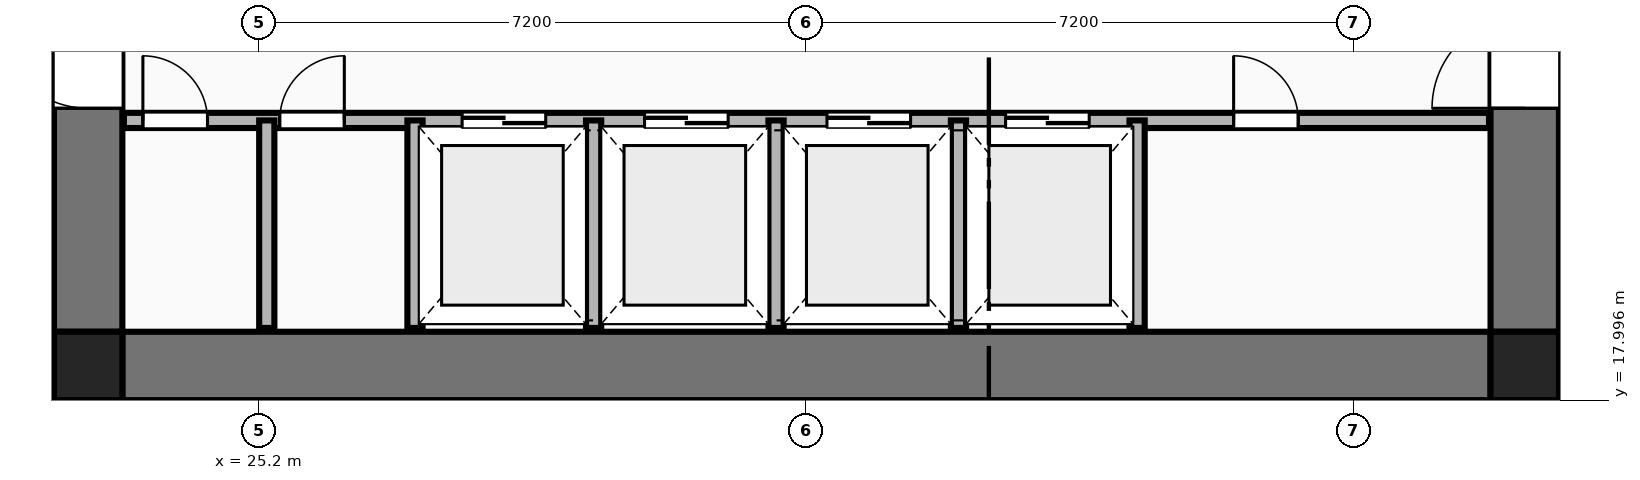
"""IFC4 building model, lengths in metres.
Left out: names, types, materials, properties, quantities, classifications, styles, units other than length and angle.
Written with IfcOpenShell. Run it as: python <this file> out.ifc"""

import sys

from ifc_helpers import new_model, si_unit, direction, frame, frame_2d, origin, origin_2d, place, context, subcontext, project, spatial, rectangle, extrude, element, fill, save


model = new_model("IFC4")
c1 = context("Model", 3, precision=1e-05, world=origin(), true_north=direction((0.0, 1.0)))
c2 = subcontext(c1, "Body", "Model", "MODEL_VIEW")
j1 = project(units=[si_unit("LENGTHUNIT", "METRE"), si_unit("PLANEANGLEUNIT", "RADIAN")], contexts=[c1])
p1 = place(None, origin())
s1 = spatial("IfcSite", under=j1, at=p1, CompositionType="ELEMENT")
p2 = place(p1, origin())
s2 = spatial("IfcBuilding", under=s1, at=p2, CompositionType="ELEMENT")
p3 = place(p2, frame((0.0, 0.0, 6.0)))
s3 = spatial("IfcBuildingStorey", under=s2, at=p3, CompositionType="ELEMENT", Elevation=6.0)
for number, where, z_axis, x_axis in (
    (1, (22.95, 18.45, 0.0), (0.0, 0.0, 1.0), (1.0, 0.0, 0.0)),
    (2, (41.85, 18.45, 0.0), (0.0, 0.0, 1.0), (1.0, 0.0, 0.0)),
):
    element("IfcColumn", number, at=place(p3, frame(where, z_axis=z_axis, x_axis=x_axis)), inside=s3, PredefinedType="COLUMN", context=c2, shape_type="SweptSolid", body=[
        extrude(rectangle(XDim=0.9, YDim=0.9, at=origin_2d()), origin(), (0.0, 0.0, 1.0), 4.5),
    ])
p4 = place(p3, frame((23.4, 18.45, 0.0), z_axis=(0.0, 0.0, 1.0), x_axis=(1.0, 0.0, 0.0)))
e3 = element("IfcWall", 3, at=p4, inside=s3, PredefinedType="SHEAR", context=c2, shape_type="SweptSolid", body=[
    extrude(rectangle(XDim=18.0, YDim=0.9, at=frame_2d((9.0, 0.0))), origin(), (0.0, 0.0, 1.0), 4.25),
])
p5 = place(p3, frame((22.95, 18.9, 0.0), z_axis=(0.0, 0.0, 1.0), x_axis=(0.0, 1.0, 0.0)))
e4 = element("IfcWall", 4, at=p5, inside=s3, PredefinedType="SHEAR", context=c2, shape_type="SweptSolid", body=[
    extrude(rectangle(XDim=14.0, YDim=0.9, at=frame_2d((7.0, 0.0))), origin(), (0.0, 0.0, 1.0), 4.25),
])
p6 = place(p5, frame((2.94, 0.0, 0.0)))
e5 = element("IfcOpeningElement", 5, at=p6, cuts=e4, PredefinedType="OPENING", context=c2, shape_type="SweptSolid", body=[
    extrude(rectangle(XDim=1.22, YDim=2.25, at=frame_2d((0.61, 1.125))), frame((0.0, 0.46, 0.0), z_axis=(0.0, -1.0, 0.0), x_axis=(1.0, 0.0, 0.0)), (0.0, 0.0, 1.0), 0.92),
])
p7 = place(p3, frame((41.85, 18.9, 0.0), z_axis=(0.0, 0.0, 1.0), x_axis=(0.0, 1.0, 0.0)))
e6 = element("IfcWall", 6, at=p7, inside=s3, PredefinedType="SHEAR", context=c2, shape_type="SweptSolid", body=[
    extrude(rectangle(XDim=14.0, YDim=0.9, at=frame_2d((7.0, 0.0))), origin(), (0.0, 0.0, 1.0), 4.25),
])
p8 = place(p7, frame((2.94, 0.0, 0.0)))
e7 = element("IfcOpeningElement", 7, at=p8, cuts=e6, PredefinedType="OPENING", context=c2, shape_type="SweptSolid", body=[
    extrude(rectangle(XDim=1.22, YDim=2.25, at=frame_2d((0.61, 1.125))), frame((0.0, 0.46, 0.0), z_axis=(0.0, -1.0, 0.0), x_axis=(1.0, 0.0, 0.0)), (0.0, 0.0, 1.0), 0.92),
])
p9 = place(p3, frame((23.42, 21.68, 0.0), z_axis=(0.0, 0.0, 1.0), x_axis=(1.0, 0.0, 0.0)))
e8 = element("IfcWall", 8, at=p9, inside=s3, PredefinedType="PLUMBINGWALL", context=c2, shape_type="SweptSolid", body=[
    extrude(rectangle(XDim=17.96, YDim=0.2, at=frame_2d((8.98, 0.0))), origin(), (0.0, 0.0, 1.0), 4.25),
])
p10 = place(p9, frame((4.45, 0.0, 0.0)))
e9 = element("IfcOpeningElement", 9, at=p10, cuts=e8, PredefinedType="OPENING", context=c2, shape_type="SweptSolid", body=[
    extrude(rectangle(XDim=1.1, YDim=2.2, at=frame_2d((0.55, 1.1))), frame((0.0, 0.11, 0.0), z_axis=(0.0, -1.0, 0.0), x_axis=(1.0, 0.0, 0.0)), (0.0, 0.0, 1.0), 0.22),
])
p11 = place(p9, frame((6.85, 0.0, 0.0)))
e10 = element("IfcOpeningElement", 10, at=p11, cuts=e8, PredefinedType="OPENING", context=c2, shape_type="SweptSolid", body=[
    extrude(rectangle(XDim=1.1, YDim=2.2, at=frame_2d((0.55, 1.1))), frame((0.0, 0.11, 0.0), z_axis=(0.0, -1.0, 0.0), x_axis=(1.0, 0.0, 0.0)), (0.0, 0.0, 1.0), 0.22),
])
p12 = place(p9, frame((9.25, 0.0, 0.0)))
e11 = element("IfcOpeningElement", 11, at=p12, cuts=e8, PredefinedType="OPENING", context=c2, shape_type="SweptSolid", body=[
    extrude(rectangle(XDim=1.1, YDim=2.2, at=frame_2d((0.55, 1.1))), frame((0.0, 0.11, 0.0), z_axis=(0.0, -1.0, 0.0), x_axis=(1.0, 0.0, 0.0)), (0.0, 0.0, 1.0), 0.22),
])
p13 = place(p9, frame((11.6, 0.0, 0.0)))
e12 = element("IfcOpeningElement", 12, at=p13, cuts=e8, PredefinedType="OPENING", context=c2, shape_type="SweptSolid", body=[
    extrude(rectangle(XDim=1.1, YDim=2.2, at=frame_2d((0.55, 1.1))), frame((0.0, 0.11, 0.0), z_axis=(0.0, -1.0, 0.0), x_axis=(1.0, 0.0, 0.0)), (0.0, 0.0, 1.0), 0.22),
])
p14 = place(p9, frame((0.25, 0.0, 0.0)))
e13 = element("IfcOpeningElement", 13, at=p14, cuts=e8, PredefinedType="OPENING", context=c2, shape_type="SweptSolid", body=[
    extrude(rectangle(XDim=0.85, YDim=2.05, at=frame_2d((0.425, 1.025))), frame((0.0, 0.11, 0.0), z_axis=(0.0, -1.0, 0.0), x_axis=(1.0, 0.0, 0.0)), (0.0, 0.0, 1.0), 0.22),
])
p15 = place(p9, frame((2.05, 0.0, 0.0)))
e14 = element("IfcOpeningElement", 14, at=p15, cuts=e8, PredefinedType="OPENING", context=c2, shape_type="SweptSolid", body=[
    extrude(rectangle(XDim=0.85, YDim=2.05, at=frame_2d((0.425, 1.025))), frame((0.0, 0.11, 0.0), z_axis=(0.0, -1.0, 0.0), x_axis=(1.0, 0.0, 0.0)), (0.0, 0.0, 1.0), 0.22),
])
p16 = place(p9, frame((14.6, 0.0, 0.0)))
e15 = element("IfcOpeningElement", 15, at=p16, cuts=e8, PredefinedType="OPENING", context=c2, shape_type="SweptSolid", body=[
    extrude(rectangle(XDim=0.85, YDim=2.05, at=frame_2d((0.425, 1.025))), frame((0.0, 0.11, 0.0), z_axis=(0.0, -1.0, 0.0), x_axis=(1.0, 0.0, 0.0)), (0.0, 0.0, 1.0), 0.22),
])
for number, where, z_axis, x_axis in (
    (16, (27.25, 18.95, 0.0), (0.0, 0.0, 1.0), (0.0, 1.0, 0.0)),
    (17, (29.6, 18.95, 0.0), (0.0, 0.0, 1.0), (0.0, 1.0, 0.0)),
    (18, (32.0, 18.95, 0.0), (0.0, 0.0, 1.0), (0.0, 1.0, 0.0)),
    (19, (34.4, 18.95, 0.0), (0.0, 0.0, 1.0), (0.0, 1.0, 0.0)),
    (20, (36.75, 18.95, 0.0), (0.0, 0.0, 1.0), (0.0, 1.0, 0.0)),
    (21, (25.3, 18.95, 0.0), (0.0, 0.0, 1.0), (0.0, 1.0, 0.0)),
):
    element("IfcWall", number, at=place(p3, frame(where, z_axis=z_axis, x_axis=x_axis)), inside=s3, PredefinedType="PLUMBINGWALL", context=c2, shape_type="SweptSolid", body=[
        extrude(rectangle(XDim=2.73, YDim=0.2, at=frame_2d((1.365, 0.0))), origin(), (0.0, 0.0, 1.0), 4.25),
    ])
p17 = place(p6, origin())
e22 = element("IfcDoor", 22, at=p17, inside=s3, OperationType="SINGLE_SWING_RIGHT", PredefinedType="DOOR", context=c2, shape_type="SweptSolid", body=[
    extrude(rectangle(XDim=1.22, YDim=2.25, at=frame_2d((0.61, 1.125))), frame((0.0, 0.025, 0.0), z_axis=(0.0, -1.0, 0.0), x_axis=(1.0, 0.0, 0.0)), (0.0, 0.0, 1.0), 0.05),
])
fill(e5, e22)
p18 = place(p8, origin())
e23 = element("IfcDoor", 23, at=p18, inside=s3, OperationType="SINGLE_SWING_LEFT", PredefinedType="DOOR", context=c2, shape_type="SweptSolid", body=[
    extrude(rectangle(XDim=1.22, YDim=2.25, at=frame_2d((0.61, 1.125))), frame((0.0, 0.025, 0.0), z_axis=(0.0, -1.0, 0.0), x_axis=(1.0, 0.0, 0.0)), (0.0, 0.0, 1.0), 0.05),
])
fill(e7, e23)
p19 = place(p10, origin())
e24 = element("IfcDoor", 24, at=p19, inside=s3, OperationType="DOUBLE_DOOR_SLIDING", PredefinedType="DOOR", context=c2, shape_type="SweptSolid", body=[
    extrude(rectangle(XDim=1.1, YDim=2.2, at=frame_2d((0.55, 1.1))), frame((0.0, 0.025, 0.0), z_axis=(0.0, -1.0, 0.0), x_axis=(1.0, 0.0, 0.0)), (0.0, 0.0, 1.0), 0.05),
])
fill(e9, e24)
p20 = place(p11, origin())
e25 = element("IfcDoor", 25, at=p20, inside=s3, OperationType="DOUBLE_DOOR_SLIDING", PredefinedType="DOOR", context=c2, shape_type="SweptSolid", body=[
    extrude(rectangle(XDim=1.1, YDim=2.2, at=frame_2d((0.55, 1.1))), frame((0.0, 0.025, 0.0), z_axis=(0.0, -1.0, 0.0), x_axis=(1.0, 0.0, 0.0)), (0.0, 0.0, 1.0), 0.05),
])
fill(e10, e25)
p21 = place(p12, origin())
e26 = element("IfcDoor", 26, at=p21, inside=s3, OperationType="DOUBLE_DOOR_SLIDING", PredefinedType="DOOR", context=c2, shape_type="SweptSolid", body=[
    extrude(rectangle(XDim=1.1, YDim=2.2, at=frame_2d((0.55, 1.1))), frame((0.0, 0.025, 0.0), z_axis=(0.0, -1.0, 0.0), x_axis=(1.0, 0.0, 0.0)), (0.0, 0.0, 1.0), 0.05),
])
fill(e11, e26)
p22 = place(p13, origin())
e27 = element("IfcDoor", 27, at=p22, inside=s3, OperationType="DOUBLE_DOOR_SLIDING", PredefinedType="DOOR", context=c2, shape_type="SweptSolid", body=[
    extrude(rectangle(XDim=1.1, YDim=2.2, at=frame_2d((0.55, 1.1))), frame((0.0, 0.025, 0.0), z_axis=(0.0, -1.0, 0.0), x_axis=(1.0, 0.0, 0.0)), (0.0, 0.0, 1.0), 0.05),
])
fill(e12, e27)
p23 = place(p14, origin())
e28 = element("IfcDoor", 28, at=p23, inside=s3, OperationType="SINGLE_SWING_LEFT", PredefinedType="DOOR", context=c2, shape_type="SweptSolid", body=[
    extrude(rectangle(XDim=0.85, YDim=2.05, at=frame_2d((0.425, 1.025))), frame((0.0, 0.025, 0.0), z_axis=(0.0, -1.0, 0.0), x_axis=(1.0, 0.0, 0.0)), (0.0, 0.0, 1.0), 0.05),
])
fill(e13, e28)
p24 = place(p15, origin())
e29 = element("IfcDoor", 29, at=p24, inside=s3, OperationType="SINGLE_SWING_RIGHT", PredefinedType="DOOR", context=c2, shape_type="SweptSolid", body=[
    extrude(rectangle(XDim=0.85, YDim=2.05, at=frame_2d((0.425, 1.025))), frame((0.0, 0.025, 0.0), z_axis=(0.0, -1.0, 0.0), x_axis=(1.0, 0.0, 0.0)), (0.0, 0.0, 1.0), 0.05),
])
fill(e14, e29)
p25 = place(p16, origin())
e30 = element("IfcDoor", 30, at=p25, inside=s3, OperationType="SINGLE_SWING_LEFT", PredefinedType="DOOR", context=c2, shape_type="SweptSolid", body=[
    extrude(rectangle(XDim=0.85, YDim=2.05, at=frame_2d((0.425, 1.025))), frame((0.0, 0.025, 0.0), z_axis=(0.0, -1.0, 0.0), x_axis=(1.0, 0.0, 0.0)), (0.0, 0.0, 1.0), 0.05),
])
fill(e15, e30)
save(model, sys.argv[1])
